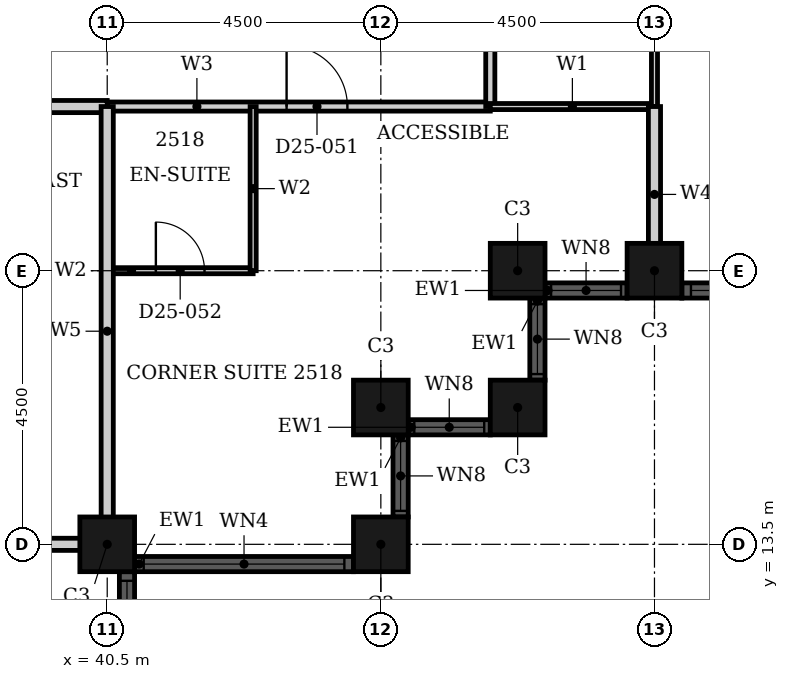
"""IFC4 building model, lengths in metres.
Left out: names, types, materials, properties, quantities, classifications, styles, units other than length and angle.
Written with IfcOpenShell. Run it as: python <this file> out.ifc"""

import sys

from ifc_helpers import new_model, si_unit, direction, frame, frame_2d, origin, origin_2d, place, context, subcontext, project, spatial, rectangle, hollow_rectangle, extrude, element, fill, save


model = new_model("IFC4")
c1 = context("Model", 3, precision=1e-05, world=origin(), true_north=direction((0.0, 1.0)))
c2 = subcontext(c1, "Body", "Model", "MODEL_VIEW")
j1 = project(units=[si_unit("LENGTHUNIT", "METRE"), si_unit("PLANEANGLEUNIT", "RADIAN")], contexts=[c1])
p1 = place(None, origin())
s1 = spatial("IfcSite", under=j1, at=p1, CompositionType="ELEMENT")
p2 = place(p1, origin())
s2 = spatial("IfcBuilding", under=s1, at=p2, CompositionType="ELEMENT")
p3 = place(p2, frame((0.0, 0.0, 104.4)))
s3 = spatial("IfcBuildingStorey", under=s2, at=p3, CompositionType="ELEMENT", Elevation=104.4)
for number, where, z_axis, x_axis in (
    (1, (40.5, 13.5, 0.0), (0.0, 0.0, 1.0), (1.0, 0.0, 0.0)),
    (2, (45.0, 13.5, 0.0), (0.0, 0.0, 1.0), (1.0, 0.0, 0.0)),
    (3, (45.0, 15.75, 0.0), (0.0, 0.0, 1.0), (1.0, 0.0, 0.0)),
    (4, (47.25, 15.75, 0.0), (0.0, 0.0, 1.0), (1.0, 0.0, 0.0)),
    (5, (47.25, 18.0, 0.0), (0.0, 0.0, 1.0), (1.0, 0.0, 0.0)),
    (6, (49.5, 18.0, 0.0), (0.0, 0.0, 1.0), (1.0, 0.0, 0.0)),
):
    element("IfcColumn", number, at=place(p3, frame(where, z_axis=z_axis, x_axis=x_axis)), inside=s3, PredefinedType="COLUMN", context=c2, shape_type="SweptSolid", body=[
        extrude(hollow_rectangle(XDim=0.9, YDim=0.9, WallThickness=0.028, at=origin_2d()), origin(), (0.0, 0.0, 1.0), 3.6),
    ])
p4 = place(p3, frame((40.825, 4.95, 0.0), z_axis=(0.0, 0.0, 1.0), x_axis=(0.0, 1.0, 0.0)))
e7 = element("IfcWall", 7, at=p4, inside=s3, PredefinedType="SOLIDWALL", context=c2, shape_type="SweptSolid", body=[
    extrude(rectangle(XDim=8.1, YDim=0.25, at=frame_2d((4.05, 0.0))), origin(), (0.0, 0.0, 1.0), 3.6),
])
p5 = place(p4, frame((0.15, 0.0, 0.9)))
e8 = element("IfcOpeningElement", 8, at=p5, cuts=e7, PredefinedType="OPENING", context=c2, shape_type="SweptSolid", body=[
    extrude(rectangle(XDim=3.3, YDim=2.08, at=frame_2d((1.65, 1.04))), frame((0.0, 0.135, 0.0), z_axis=(0.0, -1.0, 0.0), x_axis=(1.0, 0.0, 0.0)), (0.0, 0.0, 1.0), 0.27),
])
p6 = place(p4, frame((4.65, 0.0, 0.9)))
e9 = element("IfcOpeningElement", 9, at=p6, cuts=e7, PredefinedType="OPENING", context=c2, shape_type="SweptSolid", body=[
    extrude(rectangle(XDim=3.3, YDim=2.08, at=frame_2d((1.65, 1.04))), frame((0.0, 0.135, 0.0), z_axis=(0.0, -1.0, 0.0), x_axis=(1.0, 0.0, 0.0)), (0.0, 0.0, 1.0), 0.27),
])
p7 = place(p3, frame((40.95, 13.175, 0.0), z_axis=(0.0, 0.0, 1.0), x_axis=(1.0, 0.0, 0.0)))
e10 = element("IfcWall", 10, at=p7, inside=s3, PredefinedType="SOLIDWALL", context=c2, shape_type="SweptSolid", body=[
    extrude(rectangle(XDim=3.6, YDim=0.25, at=frame_2d((1.8, 0.0))), origin(), (0.0, 0.0, 1.0), 3.6),
])
p8 = place(p7, frame((0.15, 0.0, 0.9)))
e11 = element("IfcOpeningElement", 11, at=p8, cuts=e10, PredefinedType="OPENING", context=c2, shape_type="SweptSolid", body=[
    extrude(rectangle(XDim=3.3, YDim=2.08, at=frame_2d((1.65, 1.04))), frame((0.0, 0.135, 0.0), z_axis=(0.0, -1.0, 0.0), x_axis=(1.0, 0.0, 0.0)), (0.0, 0.0, 1.0), 0.27),
])
p9 = place(p3, frame((45.325, 13.95, 0.0), z_axis=(0.0, 0.0, 1.0), x_axis=(0.0, 1.0, 0.0)))
e12 = element("IfcWall", 12, at=p9, inside=s3, PredefinedType="SOLIDWALL", context=c2, shape_type="SweptSolid", body=[
    extrude(rectangle(XDim=1.35, YDim=0.25, at=frame_2d((0.675, 0.0))), origin(), (0.0, 0.0, 1.0), 3.6),
])
p10 = place(p9, frame((0.1, 0.0, 0.9)))
e13 = element("IfcOpeningElement", 13, at=p10, cuts=e12, PredefinedType="OPENING", context=c2, shape_type="SweptSolid", body=[
    extrude(rectangle(XDim=1.15, YDim=2.08, at=frame_2d((0.575, 1.04))), frame((0.0, 0.135, 0.0), z_axis=(0.0, -1.0, 0.0), x_axis=(1.0, 0.0, 0.0)), (0.0, 0.0, 1.0), 0.27),
])
p11 = place(p3, frame((45.45, 15.425, 0.0), z_axis=(0.0, 0.0, 1.0), x_axis=(1.0, 0.0, 0.0)))
e14 = element("IfcWall", 14, at=p11, inside=s3, PredefinedType="SOLIDWALL", context=c2, shape_type="SweptSolid", body=[
    extrude(rectangle(XDim=1.35, YDim=0.25, at=frame_2d((0.675, 0.0))), origin(), (0.0, 0.0, 1.0), 3.6),
])
p12 = place(p11, frame((0.1, 0.0, 0.9)))
e15 = element("IfcOpeningElement", 15, at=p12, cuts=e14, PredefinedType="OPENING", context=c2, shape_type="SweptSolid", body=[
    extrude(rectangle(XDim=1.15, YDim=2.08, at=frame_2d((0.575, 1.04))), frame((0.0, 0.135, 0.0), z_axis=(0.0, -1.0, 0.0), x_axis=(1.0, 0.0, 0.0)), (0.0, 0.0, 1.0), 0.27),
])
p13 = place(p3, frame((47.575, 16.2, 0.0), z_axis=(0.0, 0.0, 1.0), x_axis=(0.0, 1.0, 0.0)))
e16 = element("IfcWall", 16, at=p13, inside=s3, PredefinedType="SOLIDWALL", context=c2, shape_type="SweptSolid", body=[
    extrude(rectangle(XDim=1.35, YDim=0.25, at=frame_2d((0.675, 0.0))), origin(), (0.0, 0.0, 1.0), 3.6),
])
p14 = place(p13, frame((0.1, 0.0, 0.9)))
e17 = element("IfcOpeningElement", 17, at=p14, cuts=e16, PredefinedType="OPENING", context=c2, shape_type="SweptSolid", body=[
    extrude(rectangle(XDim=1.15, YDim=2.08, at=frame_2d((0.575, 1.04))), frame((0.0, 0.135, 0.0), z_axis=(0.0, -1.0, 0.0), x_axis=(1.0, 0.0, 0.0)), (0.0, 0.0, 1.0), 0.27),
])
p15 = place(p3, frame((47.7, 17.675, 0.0), z_axis=(0.0, 0.0, 1.0), x_axis=(1.0, 0.0, 0.0)))
e18 = element("IfcWall", 18, at=p15, inside=s3, PredefinedType="SOLIDWALL", context=c2, shape_type="SweptSolid", body=[
    extrude(rectangle(XDim=1.35, YDim=0.25, at=frame_2d((0.675, 0.0))), origin(), (0.0, 0.0, 1.0), 3.6),
])
p16 = place(p15, frame((0.1, 0.0, 0.9)))
e19 = element("IfcOpeningElement", 19, at=p16, cuts=e18, PredefinedType="OPENING", context=c2, shape_type="SweptSolid", body=[
    extrude(rectangle(XDim=1.15, YDim=2.08, at=frame_2d((0.575, 1.04))), frame((0.0, 0.135, 0.0), z_axis=(0.0, -1.0, 0.0), x_axis=(1.0, 0.0, 0.0)), (0.0, 0.0, 1.0), 0.27),
])
p17 = place(p3, frame((49.95, 17.675, 0.0), z_axis=(0.0, 0.0, 1.0), x_axis=(1.0, 0.0, 0.0)))
e20 = element("IfcWall", 20, at=p17, inside=s3, PredefinedType="SOLIDWALL", context=c2, shape_type="SweptSolid", body=[
    extrude(rectangle(XDim=8.1, YDim=0.25, at=frame_2d((4.05, 0.0))), origin(), (0.0, 0.0, 1.0), 3.6),
])
p18 = place(p17, frame((0.15, 0.0, 0.9)))
e21 = element("IfcOpeningElement", 21, at=p18, cuts=e20, PredefinedType="OPENING", context=c2, shape_type="SweptSolid", body=[
    extrude(rectangle(XDim=3.3, YDim=2.08, at=frame_2d((1.65, 1.04))), frame((0.0, 0.135, 0.0), z_axis=(0.0, -1.0, 0.0), x_axis=(1.0, 0.0, 0.0)), (0.0, 0.0, 1.0), 0.27),
])
p19 = place(p17, frame((4.65, 0.0, 0.9)))
e22 = element("IfcOpeningElement", 22, at=p19, cuts=e20, PredefinedType="OPENING", context=c2, shape_type="SweptSolid", body=[
    extrude(rectangle(XDim=3.3, YDim=2.08, at=frame_2d((1.65, 1.04))), frame((0.0, 0.135, 0.0), z_axis=(0.0, -1.0, 0.0), x_axis=(1.0, 0.0, 0.0)), (0.0, 0.0, 1.0), 0.27),
])
p20 = place(p3, frame((40.5, 20.7, 0.0), z_axis=(0.0, 0.0, 1.0), x_axis=(1.0, 0.0, 0.0)))
e23 = element("IfcWall", 23, at=p20, inside=s3, PredefinedType="PARTITIONING", context=c2, shape_type="SweptSolid", body=[
    extrude(rectangle(XDim=6.3, YDim=0.15, at=frame_2d((3.15, 0.0))), origin(), (0.0, 0.0, 1.0), 3.3),
])
p21 = place(p20, frame((2.95, 0.0, 0.0)))
e24 = element("IfcOpeningElement", 24, at=p21, cuts=e23, PredefinedType="OPENING", context=c2, shape_type="SweptSolid", body=[
    extrude(rectangle(XDim=1.0, YDim=2.1, at=frame_2d((0.5, 1.05))), frame((0.0, 0.085, 0.0), z_axis=(0.0, -1.0, 0.0), x_axis=(1.0, 0.0, 0.0)), (0.0, 0.0, 1.0), 0.17),
])
p22 = place(p3, frame((46.8, 20.7, 0.0), z_axis=(0.0, 0.0, 1.0), x_axis=(0.0, 1.0, 0.0)))
e25 = element("IfcWall", 25, at=p22, inside=s3, PredefinedType="PARTITIONING", context=c2, shape_type="SweptSolid", body=[
    extrude(rectangle(XDim=6.3, YDim=0.15, at=frame_2d((3.15, 0.0))), origin(), (0.0, 0.0, 1.0), 3.3),
])
p23 = place(p22, frame((2.625, 0.0, 0.0)))
e26 = element("IfcOpeningElement", 26, at=p23, cuts=e25, PredefinedType="OPENING", context=c2, shape_type="SweptSolid", body=[
    extrude(rectangle(XDim=0.95, YDim=2.1, at=frame_2d((0.475, 1.05))), frame((0.0, 0.085, 0.0), z_axis=(0.0, -1.0, 0.0), x_axis=(1.0, 0.0, 0.0)), (0.0, 0.0, 1.0), 0.17),
])
p24 = place(p3, frame((46.8, 20.7, 0.0), z_axis=(0.0, 0.0, 1.0), x_axis=(1.0, 0.0, 0.0)))
e27 = element("IfcWall", 27, at=p24, inside=s3, PredefinedType="PARTITIONING", context=c2, shape_type="SweptSolid", body=[
    extrude(rectangle(XDim=2.7, YDim=0.1, at=frame_2d((1.35, 0.0))), origin(), (0.0, 0.0, 1.0), 3.3),
])
p25 = place(p3, frame((49.5, 20.7, 0.0), z_axis=(0.0, 0.0, 1.0), x_axis=(0.0, 1.0, 0.0)))
e28 = element("IfcWall", 28, at=p25, inside=s3, PredefinedType="PARTITIONING", context=c2, shape_type="SweptSolid", body=[
    extrude(rectangle(XDim=6.3, YDim=0.1, at=frame_2d((3.15, 0.0))), origin(), (0.0, 0.0, 1.0), 2.38),
])
p26 = place(p3, frame((49.5, 17.81, 0.0), z_axis=(0.0, 0.0, 1.0), x_axis=(0.0, 1.0, 0.0)))
e29 = element("IfcWall", 29, at=p26, inside=s3, PredefinedType="PARTITIONING", context=c2, shape_type="SweptSolid", body=[
    extrude(rectangle(XDim=2.89, YDim=0.2, at=frame_2d((1.445, 0.0))), origin(), (0.0, 0.0, 1.0), 2.38),
])
p27 = place(p3, frame((40.5, 18.0, 0.0), z_axis=(0.0, 0.0, 1.0), x_axis=(1.0, 0.0, 0.0)))
e30 = element("IfcWall", 30, at=p27, inside=s3, PredefinedType="PARTITIONING", context=c2, shape_type="SweptSolid", body=[
    extrude(rectangle(XDim=2.4, YDim=0.1, at=frame_2d((1.2, 0.0))), origin(), (0.0, 0.0, 1.0), 3.3),
])
p28 = place(p27, frame((0.8, 0.0, 0.0)))
e31 = element("IfcOpeningElement", 31, at=p28, cuts=e30, PredefinedType="OPENING", context=c2, shape_type="SweptSolid", body=[
    extrude(rectangle(XDim=0.8, YDim=2.1, at=frame_2d((0.4, 1.05))), frame((0.0, 0.06, 0.0), z_axis=(0.0, -1.0, 0.0), x_axis=(1.0, 0.0, 0.0)), (0.0, 0.0, 1.0), 0.12),
])
p29 = place(p3, frame((42.9, 18.0, 0.0), z_axis=(0.0, 0.0, 1.0), x_axis=(0.0, 1.0, 0.0)))
e32 = element("IfcWall", 32, at=p29, inside=s3, PredefinedType="PARTITIONING", context=c2, shape_type="SweptSolid", body=[
    extrude(rectangle(XDim=2.7, YDim=0.1, at=frame_2d((1.35, 0.0))), origin(), (0.0, 0.0, 1.0), 3.3),
])
p30 = place(p3, frame((34.5, 13.5, 0.0), z_axis=(0.0, 0.0, 1.0), x_axis=(1.0, 0.0, 0.0)))
e33 = element("IfcWall", 33, at=p30, inside=s3, PredefinedType="PARTITIONING", context=c2, shape_type="SweptSolid", body=[
    extrude(rectangle(XDim=6.19, YDim=0.2, at=frame_2d((3.095, 0.0))), origin(), (0.0, 0.0, 1.0), 2.38),
])
p31 = place(p3, frame((34.5, 20.7, 0.0), z_axis=(0.0, 0.0, 1.0), x_axis=(1.0, 0.0, 0.0)))
e34 = element("IfcWall", 34, at=p31, inside=s3, PredefinedType="PARTITIONING", context=c2, shape_type="SweptSolid", body=[
    extrude(rectangle(XDim=6.0, YDim=0.2, at=frame_2d((3.0, 0.0))), origin(), (0.0, 0.0, 1.0), 3.3),
])
p32 = place(p31, frame((2.55, 0.0, 0.0)))
e35 = element("IfcOpeningElement", 35, at=p32, cuts=e34, PredefinedType="OPENING", context=c2, shape_type="SweptSolid", body=[
    extrude(rectangle(XDim=0.9, YDim=2.1, at=frame_2d((0.45, 1.05))), frame((0.0, 0.11, 0.0), z_axis=(0.0, -1.0, 0.0), x_axis=(1.0, 0.0, 0.0)), (0.0, 0.0, 1.0), 0.22),
])
p33 = place(p3, frame((40.5, 13.31, 0.0), z_axis=(0.0, 0.0, 1.0), x_axis=(0.0, 1.0, 0.0)))
e36 = element("IfcWall", 36, at=p33, inside=s3, PredefinedType="PARTITIONING", context=c2, shape_type="SweptSolid", body=[
    extrude(rectangle(XDim=7.39, YDim=0.2, at=frame_2d((3.695, 0.0))), origin(), (0.0, 0.0, 1.0), 3.3),
])
p34 = place(p6, origin())
e37 = element("IfcWindow", 37, at=p34, inside=s3, PartitioningType="SINGLE_PANEL", PredefinedType="WINDOW", context=c2, shape_type="SweptSolid", body=[
    extrude(rectangle(XDim=3.3, YDim=2.08, at=frame_2d((1.65, 1.04))), frame((0.0, 0.03, 0.0), z_axis=(0.0, -1.0, 0.0), x_axis=(1.0, 0.0, 0.0)), (0.0, 0.0, 1.0), 0.06),
])
fill(e9, e37)
p35 = place(p8, origin())
e38 = element("IfcWindow", 38, at=p35, inside=s3, PartitioningType="SINGLE_PANEL", PredefinedType="WINDOW", context=c2, shape_type="SweptSolid", body=[
    extrude(rectangle(XDim=3.3, YDim=2.08, at=frame_2d((1.65, 1.04))), frame((0.0, 0.03, 0.0), z_axis=(0.0, -1.0, 0.0), x_axis=(1.0, 0.0, 0.0)), (0.0, 0.0, 1.0), 0.06),
])
fill(e11, e38)
p36 = place(p10, origin())
e39 = element("IfcWindow", 39, at=p36, inside=s3, PartitioningType="SINGLE_PANEL", PredefinedType="WINDOW", context=c2, shape_type="SweptSolid", body=[
    extrude(rectangle(XDim=1.15, YDim=2.08, at=frame_2d((0.575, 1.04))), frame((0.0, 0.03, 0.0), z_axis=(0.0, -1.0, 0.0), x_axis=(1.0, 0.0, 0.0)), (0.0, 0.0, 1.0), 0.06),
])
fill(e13, e39)
p37 = place(p12, origin())
e40 = element("IfcWindow", 40, at=p37, inside=s3, PartitioningType="SINGLE_PANEL", PredefinedType="WINDOW", context=c2, shape_type="SweptSolid", body=[
    extrude(rectangle(XDim=1.15, YDim=2.08, at=frame_2d((0.575, 1.04))), frame((0.0, 0.03, 0.0), z_axis=(0.0, -1.0, 0.0), x_axis=(1.0, 0.0, 0.0)), (0.0, 0.0, 1.0), 0.06),
])
fill(e15, e40)
p38 = place(p14, origin())
e41 = element("IfcWindow", 41, at=p38, inside=s3, PartitioningType="SINGLE_PANEL", PredefinedType="WINDOW", context=c2, shape_type="SweptSolid", body=[
    extrude(rectangle(XDim=1.15, YDim=2.08, at=frame_2d((0.575, 1.04))), frame((0.0, 0.03, 0.0), z_axis=(0.0, -1.0, 0.0), x_axis=(1.0, 0.0, 0.0)), (0.0, 0.0, 1.0), 0.06),
])
fill(e17, e41)
p39 = place(p16, origin())
e42 = element("IfcWindow", 42, at=p39, inside=s3, PartitioningType="SINGLE_PANEL", PredefinedType="WINDOW", context=c2, shape_type="SweptSolid", body=[
    extrude(rectangle(XDim=1.15, YDim=2.08, at=frame_2d((0.575, 1.04))), frame((0.0, 0.03, 0.0), z_axis=(0.0, -1.0, 0.0), x_axis=(1.0, 0.0, 0.0)), (0.0, 0.0, 1.0), 0.06),
])
fill(e19, e42)
p40 = place(p18, origin())
e43 = element("IfcWindow", 43, at=p40, inside=s3, PartitioningType="SINGLE_PANEL", PredefinedType="WINDOW", context=c2, shape_type="SweptSolid", body=[
    extrude(rectangle(XDim=3.3, YDim=2.08, at=frame_2d((1.65, 1.04))), frame((0.0, 0.03, 0.0), z_axis=(0.0, -1.0, 0.0), x_axis=(1.0, 0.0, 0.0)), (0.0, 0.0, 1.0), 0.06),
])
fill(e21, e43)
p41 = place(p21, origin())
e44 = element("IfcDoor", 44, at=p41, inside=s3, OperationType="SINGLE_SWING_RIGHT", PredefinedType="DOOR", context=c2, shape_type="SweptSolid", body=[
    extrude(rectangle(XDim=1.0, YDim=2.1, at=frame_2d((0.5, 1.05))), frame((0.0, 0.025, 0.0), z_axis=(0.0, -1.0, 0.0), x_axis=(1.0, 0.0, 0.0)), (0.0, 0.0, 1.0), 0.05),
])
fill(e24, e44)
p42 = place(p28, origin())
e45 = element("IfcDoor", 45, at=p42, inside=s3, OperationType="SINGLE_SWING_RIGHT", PredefinedType="DOOR", context=c2, shape_type="SweptSolid", body=[
    extrude(rectangle(XDim=0.8, YDim=2.1, at=frame_2d((0.4, 1.05))), frame((0.0, 0.025, 0.0), z_axis=(0.0, -1.0, 0.0), x_axis=(1.0, 0.0, 0.0)), (0.0, 0.0, 1.0), 0.05),
])
fill(e31, e45)
save(model, sys.argv[1])
